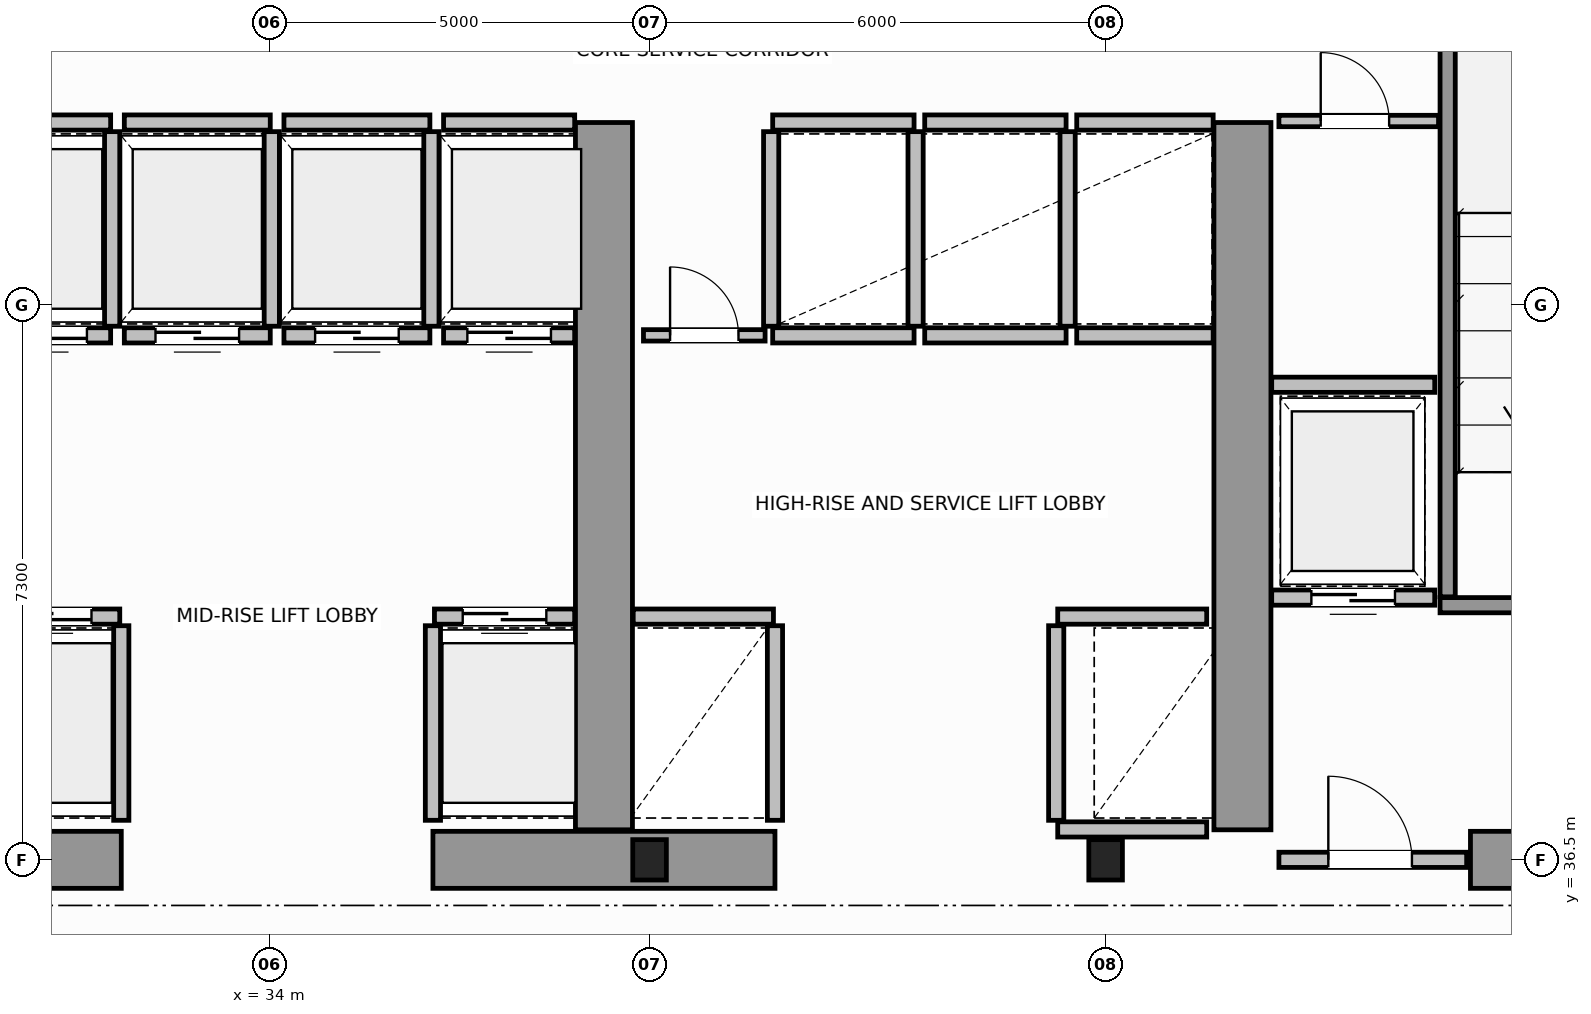
"""IFC4 building model, lengths in metres.
Left out: names, types, materials, properties, quantities, classifications, styles, units other than length and angle.
Written with IfcOpenShell. Run it as: python <this file> out.ifc"""

import sys

from ifc_helpers import new_model, si_unit, direction, frame, frame_2d, origin, origin_2d, place, context, subcontext, project, spatial, rectangle, i_section, extrude, source, transform, mapped, element, fill, save


model = new_model("IFC4")
c1 = context("Model", 3, precision=1e-05, world=origin(), true_north=direction((0.0, 1.0)))
c2 = subcontext(c1, "Body", "Model", "MODEL_VIEW")
j1 = project(units=[si_unit("LENGTHUNIT", "METRE"), si_unit("PLANEANGLEUNIT", "RADIAN")], contexts=[c1])
p1 = place(None, origin())
s1 = spatial("IfcSite", under=j1, at=p1, CompositionType="ELEMENT")
p2 = place(p1, origin())
s2 = spatial("IfcBuilding", under=s1, at=p2, CompositionType="ELEMENT")
p3 = place(p2, frame((0.0, 0.0, 133.8)))
s3 = spatial("IfcBuildingStorey", under=s2, at=p3, CompositionType="ELEMENT", Elevation=133.8)
m1 = source(origin(), c2, "Body", "SweptSolid", [
    extrude(i_section(OverallWidth=0.442, OverallDepth=0.531, WebThickness=0.065, FlangeThickness=0.076, FilletRadius=0.015, at=origin_2d()), origin(), (0.0, 0.0, 1.0), 3.8),
])
for number, where, z_axis, x_axis in (
    (1, (39.0, 36.5, 0.0), (0.0, 0.0, 1.0), (1.0, 0.0, 0.0)),
    (2, (45.0, 36.5, 0.0), (0.0, 0.0, 1.0), (1.0, 0.0, 0.0)),
):
    element("IfcColumn", number, at=place(p3, frame(where, z_axis=z_axis, x_axis=x_axis)), inside=s3, PredefinedType="COLUMN", context=c2, shape_type="MappedRepresentation", body=[
        mapped(m1, transform((0.0, 0.0, 0.0), scale=1.0)),
    ])
for number, where, z_axis, x_axis in (
    (3, (27.55, 36.5, 0.0), (0.0, 0.0, 1.0), (1.0, 0.0, 0.0)),
    (4, (36.15, 36.5, 0.0), (0.0, 0.0, 1.0), (1.0, 0.0, 0.0)),
):
    element("IfcWall", number, at=place(p3, frame(where, z_axis=z_axis, x_axis=x_axis)), inside=s3, PredefinedType="SHEAR", context=c2, shape_type="SweptSolid", body=[
        extrude(rectangle(XDim=4.5, YDim=0.75, at=frame_2d((2.25, 0.0))), origin(), (0.0, 0.0, 1.0), 3.8),
    ])
p4 = place(p3, frame((49.8, 36.5, 0.0), z_axis=(0.0, 0.0, 1.0), x_axis=(1.0, 0.0, 0.0)))
e5 = element("IfcWall", 5, at=p4, inside=s3, PredefinedType="SHEAR", context=c2, shape_type="SweptSolid", body=[
    extrude(rectangle(XDim=3.805, YDim=0.75, at=frame_2d((1.902, 0.0))), origin(), (0.0, 0.0, 1.0), 2.38),
])
for number, where, z_axis, x_axis in (
    (6, (38.4, 36.895, 0.0), (0.0, 0.0, 1.0), (0.0, 1.0, 0.0)),
    (7, (46.8, 36.895, 0.0), (0.0, 0.0, 1.0), (0.0, 1.0, 0.0)),
):
    element("IfcWall", number, at=place(p3, frame(where, z_axis=z_axis, x_axis=x_axis)), inside=s3, PredefinedType="SHEAR", context=c2, shape_type="SweptSolid", body=[
        extrude(rectangle(XDim=9.305, YDim=0.75, at=frame_2d((4.652, 0.0))), origin(), (0.0, 0.0, 1.0), 3.8),
    ])
p5 = place(p3, frame((49.4, 39.85, 0.0), z_axis=(0.0, 0.0, 1.0), x_axis=(1.0, 0.0, 0.0)))
e8 = element("IfcWall", 8, at=p5, inside=s3, PredefinedType="SOLIDWALL", context=c2, shape_type="SweptSolid", body=[
    extrude(rectangle(XDim=4.225, YDim=0.2, at=frame_2d((2.113, 0.0))), origin(), (0.0, 0.0, 1.0), 3.8),
])
p6 = place(p5, frame((1.325, 0.0, 0.0)))
e9 = element("IfcOpeningElement", 9, at=p6, cuts=e8, PredefinedType="OPENING", context=c2, shape_type="SweptSolid", body=[
    extrude(rectangle(XDim=1.1, YDim=2.15, at=frame_2d((0.55, 1.075))), frame((0.0, 0.11, 0.0), z_axis=(0.0, -1.0, 0.0), x_axis=(1.0, 0.0, 0.0)), (0.0, 0.0, 1.0), 0.22),
])
p7 = place(p3, frame((49.5, 39.96, 0.0), z_axis=(0.0, 0.0, 1.0), x_axis=(0.0, 1.0, 0.0)))
e10 = element("IfcWall", 10, at=p7, inside=s3, PredefinedType="SOLIDWALL", context=c2, shape_type="SweptSolid", body=[
    extrude(rectangle(XDim=9.93, YDim=0.2, at=frame_2d((4.965, 0.0))), origin(), (0.0, 0.0, 1.0), 3.8),
])
p8 = place(p3, frame((47.28, 36.5, 0.0), z_axis=(0.0, 0.0, 1.0), x_axis=(1.0, 0.0, 0.0)))
e11 = element("IfcWall", 11, at=p8, inside=s3, PredefinedType="SOLIDWALL", context=c2, shape_type="SweptSolid", body=[
    extrude(rectangle(XDim=2.47, YDim=0.2, at=frame_2d((1.235, 0.0))), origin(), (0.0, 0.0, 1.0), 2.37),
])
p9 = place(p8, frame((0.65, 0.0, 0.0)))
e12 = element("IfcOpeningElement", 12, at=p9, cuts=e11, PredefinedType="OPENING", context=c2, shape_type="SweptSolid", body=[
    extrude(rectangle(XDim=1.1, YDim=2.15, at=frame_2d((0.55, 1.075))), frame((0.0, 0.11, 0.0), z_axis=(0.0, -1.0, 0.0), x_axis=(1.0, 0.0, 0.0)), (0.0, 0.0, 1.0), 0.22),
])
p10 = place(p3, frame((30.185, 39.7, 0.0), z_axis=(0.0, 0.0, 1.0), x_axis=(1.0, 0.0, 0.0)))
e13 = element("IfcWall", 13, at=p10, inside=s3, PredefinedType="SOLIDWALL", context=c2, shape_type="SweptSolid", body=[
    extrude(rectangle(XDim=1.845, YDim=0.2, at=frame_2d((0.922, 0.0))), origin(), (0.0, 0.0, 1.0), 3.58),
])
p11 = place(p10, frame((0.373, 0.0, 0.0)))
e14 = element("IfcOpeningElement", 14, at=p11, cuts=e13, PredefinedType="OPENING", context=c2, shape_type="SweptSolid", body=[
    extrude(rectangle(XDim=1.1, YDim=2.15, at=frame_2d((0.55, 1.075))), frame((0.0, 0.11, 0.0), z_axis=(0.0, -1.0, 0.0), x_axis=(1.0, 0.0, 0.0)), (0.0, 0.0, 1.0), 0.22),
])
p12 = place(p3, frame((32.05, 37.02, 0.0), z_axis=(0.0, 0.0, 1.0), x_axis=(0.0, 1.0, 0.0)))
e15 = element("IfcWall", 15, at=p12, inside=s3, PredefinedType="SOLIDWALL", context=c2, shape_type="SweptSolid", body=[
    extrude(rectangle(XDim=2.56, YDim=0.2, at=frame_2d((1.28, 0.0))), origin(), (0.0, 0.0, 1.0), 3.58),
])
p13 = place(p3, frame((36.17, 39.7, 0.0), z_axis=(0.0, 0.0, 1.0), x_axis=(1.0, 0.0, 0.0)))
e16 = element("IfcWall", 16, at=p13, inside=s3, PredefinedType="SOLIDWALL", context=c2, shape_type="SweptSolid", body=[
    extrude(rectangle(XDim=1.845, YDim=0.2, at=frame_2d((0.922, 0.0))), origin(), (0.0, 0.0, 1.0), 3.58),
])
p14 = place(p13, frame((0.372, 0.0, 0.0)))
e17 = element("IfcOpeningElement", 17, at=p14, cuts=e16, PredefinedType="OPENING", context=c2, shape_type="SweptSolid", body=[
    extrude(rectangle(XDim=1.1, YDim=2.15, at=frame_2d((0.55, 1.075))), frame((0.0, 0.11, 0.0), z_axis=(0.0, -1.0, 0.0), x_axis=(1.0, 0.0, 0.0)), (0.0, 0.0, 1.0), 0.22),
])
p15 = place(p3, frame((36.15, 37.02, 0.0), z_axis=(0.0, 0.0, 1.0), x_axis=(0.0, 1.0, 0.0)))
e18 = element("IfcWall", 18, at=p15, inside=s3, PredefinedType="SOLIDWALL", context=c2, shape_type="SweptSolid", body=[
    extrude(rectangle(XDim=2.56, YDim=0.2, at=frame_2d((1.28, 0.0))), origin(), (0.0, 0.0, 1.0), 3.58),
])
p16 = place(p3, frame((30.185, 43.4, 0.0), z_axis=(0.0, 0.0, 1.0), x_axis=(1.0, 0.0, 0.0)))
e19 = element("IfcWall", 19, at=p16, inside=s3, PredefinedType="SOLIDWALL", context=c2, shape_type="SweptSolid", body=[
    extrude(rectangle(XDim=1.725, YDim=0.2, at=frame_2d((0.862, 0.0))), origin(), (0.0, 0.0, 1.0), 3.58),
])
p17 = place(p16, frame((0.313, 0.0, 0.0)))
e20 = element("IfcOpeningElement", 20, at=p17, cuts=e19, PredefinedType="OPENING", context=c2, shape_type="SweptSolid", body=[
    extrude(rectangle(XDim=1.1, YDim=2.15, at=frame_2d((0.55, 1.075))), frame((0.0, 0.11, 0.0), z_axis=(0.0, -1.0, 0.0), x_axis=(1.0, 0.0, 0.0)), (0.0, 0.0, 1.0), 0.22),
])
p18 = place(p3, frame((30.185, 46.2, 0.0), z_axis=(0.0, 0.0, 1.0), x_axis=(1.0, 0.0, 0.0)))
e21 = element("IfcWall", 21, at=p18, inside=s3, PredefinedType="SOLIDWALL", context=c2, shape_type="SweptSolid", body=[
    extrude(rectangle(XDim=1.725, YDim=0.2, at=frame_2d((0.862, 0.0))), origin(), (0.0, 0.0, 1.0), 3.58),
])
p19 = place(p3, frame((31.93, 43.52, 0.0), z_axis=(0.0, 0.0, 1.0), x_axis=(0.0, 1.0, 0.0)))
e22 = element("IfcWall", 22, at=p19, inside=s3, PredefinedType="SOLIDWALL", context=c2, shape_type="SweptSolid", body=[
    extrude(rectangle(XDim=2.56, YDim=0.2, at=frame_2d((1.28, 0.0))), origin(), (0.0, 0.0, 1.0), 3.58),
])
p20 = place(p3, frame((32.09, 43.4, 0.0), z_axis=(0.0, 0.0, 1.0), x_axis=(1.0, 0.0, 0.0)))
e23 = element("IfcWall", 23, at=p20, inside=s3, PredefinedType="SOLIDWALL", context=c2, shape_type="SweptSolid", body=[
    extrude(rectangle(XDim=1.92, YDim=0.2, at=frame_2d((0.96, 0.0))), origin(), (0.0, 0.0, 1.0), 3.58),
])
p21 = place(p20, frame((0.41, 0.0, 0.0)))
e24 = element("IfcOpeningElement", 24, at=p21, cuts=e23, PredefinedType="OPENING", context=c2, shape_type="SweptSolid", body=[
    extrude(rectangle(XDim=1.1, YDim=2.15, at=frame_2d((0.55, 1.075))), frame((0.0, 0.11, 0.0), z_axis=(0.0, -1.0, 0.0), x_axis=(1.0, 0.0, 0.0)), (0.0, 0.0, 1.0), 0.22),
])
p22 = place(p3, frame((32.09, 46.2, 0.0), z_axis=(0.0, 0.0, 1.0), x_axis=(1.0, 0.0, 0.0)))
e25 = element("IfcWall", 25, at=p22, inside=s3, PredefinedType="SOLIDWALL", context=c2, shape_type="SweptSolid", body=[
    extrude(rectangle(XDim=1.92, YDim=0.2, at=frame_2d((0.96, 0.0))), origin(), (0.0, 0.0, 1.0), 3.58),
])
p23 = place(p3, frame((34.03, 43.52, 0.0), z_axis=(0.0, 0.0, 1.0), x_axis=(0.0, 1.0, 0.0)))
e26 = element("IfcWall", 26, at=p23, inside=s3, PredefinedType="SOLIDWALL", context=c2, shape_type="SweptSolid", body=[
    extrude(rectangle(XDim=2.56, YDim=0.2, at=frame_2d((1.28, 0.0))), origin(), (0.0, 0.0, 1.0), 3.58),
])
p24 = place(p3, frame((34.19, 43.4, 0.0), z_axis=(0.0, 0.0, 1.0), x_axis=(1.0, 0.0, 0.0)))
e27 = element("IfcWall", 27, at=p24, inside=s3, PredefinedType="SOLIDWALL", context=c2, shape_type="SweptSolid", body=[
    extrude(rectangle(XDim=1.92, YDim=0.2, at=frame_2d((0.96, 0.0))), origin(), (0.0, 0.0, 1.0), 3.58),
])
p25 = place(p24, frame((0.41, 0.0, 0.0)))
e28 = element("IfcOpeningElement", 28, at=p25, cuts=e27, PredefinedType="OPENING", context=c2, shape_type="SweptSolid", body=[
    extrude(rectangle(XDim=1.1, YDim=2.15, at=frame_2d((0.55, 1.075))), frame((0.0, 0.11, 0.0), z_axis=(0.0, -1.0, 0.0), x_axis=(1.0, 0.0, 0.0)), (0.0, 0.0, 1.0), 0.22),
])
p26 = place(p3, frame((34.19, 46.2, 0.0), z_axis=(0.0, 0.0, 1.0), x_axis=(1.0, 0.0, 0.0)))
e29 = element("IfcWall", 29, at=p26, inside=s3, PredefinedType="SOLIDWALL", context=c2, shape_type="SweptSolid", body=[
    extrude(rectangle(XDim=1.92, YDim=0.2, at=frame_2d((0.96, 0.0))), origin(), (0.0, 0.0, 1.0), 3.58),
])
p27 = place(p3, frame((36.13, 43.52, 0.0), z_axis=(0.0, 0.0, 1.0), x_axis=(0.0, 1.0, 0.0)))
e30 = element("IfcWall", 30, at=p27, inside=s3, PredefinedType="SOLIDWALL", context=c2, shape_type="SweptSolid", body=[
    extrude(rectangle(XDim=2.56, YDim=0.2, at=frame_2d((1.28, 0.0))), origin(), (0.0, 0.0, 1.0), 3.58),
])
p28 = place(p3, frame((36.29, 43.4, 0.0), z_axis=(0.0, 0.0, 1.0), x_axis=(1.0, 0.0, 0.0)))
e31 = element("IfcWall", 31, at=p28, inside=s3, PredefinedType="SOLIDWALL", context=c2, shape_type="SweptSolid", body=[
    extrude(rectangle(XDim=1.725, YDim=0.2, at=frame_2d((0.862, 0.0))), origin(), (0.0, 0.0, 1.0), 3.58),
])
p29 = place(p28, frame((0.313, 0.0, 0.0)))
e32 = element("IfcOpeningElement", 32, at=p29, cuts=e31, PredefinedType="OPENING", context=c2, shape_type="SweptSolid", body=[
    extrude(rectangle(XDim=1.1, YDim=2.15, at=frame_2d((0.55, 1.075))), frame((0.0, 0.11, 0.0), z_axis=(0.0, -1.0, 0.0), x_axis=(1.0, 0.0, 0.0)), (0.0, 0.0, 1.0), 0.22),
])
p30 = place(p3, frame((36.29, 46.2, 0.0), z_axis=(0.0, 0.0, 1.0), x_axis=(1.0, 0.0, 0.0)))
e33 = element("IfcWall", 33, at=p30, inside=s3, PredefinedType="SOLIDWALL", context=c2, shape_type="SweptSolid", body=[
    extrude(rectangle(XDim=1.725, YDim=0.2, at=frame_2d((0.862, 0.0))), origin(), (0.0, 0.0, 1.0), 3.58),
])
p31 = place(p3, frame((38.785, 39.7, 0.0), z_axis=(0.0, 0.0, 1.0), x_axis=(1.0, 0.0, 0.0)))
e34 = element("IfcWall", 34, at=p31, inside=s3, PredefinedType="SOLIDWALL", context=c2, shape_type="SweptSolid", body=[
    extrude(rectangle(XDim=1.845, YDim=0.2, at=frame_2d((0.922, 0.0))), origin(), (0.0, 0.0, 1.0), 3.58),
])
p32 = place(p3, frame((40.65, 37.02, 0.0), z_axis=(0.0, 0.0, 1.0), x_axis=(0.0, 1.0, 0.0)))
e35 = element("IfcWall", 35, at=p32, inside=s3, PredefinedType="SOLIDWALL", context=c2, shape_type="SweptSolid", body=[
    extrude(rectangle(XDim=2.56, YDim=0.2, at=frame_2d((1.28, 0.0))), origin(), (0.0, 0.0, 1.0), 3.58),
])
p33 = place(p3, frame((44.37, 39.7, 0.0), z_axis=(0.0, 0.0, 1.0), x_axis=(1.0, 0.0, 0.0)))
e36 = element("IfcWall", 36, at=p33, inside=s3, PredefinedType="SOLIDWALL", context=c2, shape_type="SweptSolid", body=[
    extrude(rectangle(XDim=1.96, YDim=0.2, at=frame_2d((0.98, 0.0))), origin(), (0.0, 0.0, 1.0), 3.58),
])
p34 = place(p3, frame((44.37, 36.9, 0.0), z_axis=(0.0, 0.0, 1.0), x_axis=(1.0, 0.0, 0.0)))
e37 = element("IfcWall", 37, at=p34, inside=s3, PredefinedType="SOLIDWALL", context=c2, shape_type="SweptSolid", body=[
    extrude(rectangle(XDim=1.96, YDim=0.2, at=frame_2d((0.98, 0.0))), origin(), (0.0, 0.0, 1.0), 2.37),
])
p35 = place(p3, frame((44.35, 37.02, 0.0), z_axis=(0.0, 0.0, 1.0), x_axis=(0.0, 1.0, 0.0)))
e38 = element("IfcWall", 38, at=p35, inside=s3, PredefinedType="SOLIDWALL", context=c2, shape_type="SweptSolid", body=[
    extrude(rectangle(XDim=2.56, YDim=0.2, at=frame_2d((1.28, 0.0))), origin(), (0.0, 0.0, 1.0), 3.58),
])
for number, where, z_axis, x_axis in (
    (39, (40.62, 43.4, 0.0), (0.0, 0.0, 1.0), (1.0, 0.0, 0.0)),
    (40, (40.62, 46.2, 0.0), (0.0, 0.0, 1.0), (1.0, 0.0, 0.0)),
):
    element("IfcWall", number, at=place(p3, frame(where, z_axis=z_axis, x_axis=x_axis)), inside=s3, PredefinedType="SOLIDWALL", context=c2, shape_type="SweptSolid", body=[
        extrude(rectangle(XDim=1.86, YDim=0.2, at=frame_2d((0.93, 0.0))), origin(), (0.0, 0.0, 1.0), 3.58),
    ])
for number, where, z_axis, x_axis in (
    (41, (40.6, 43.52, 0.0), (0.0, 0.0, 1.0), (0.0, 1.0, 0.0)),
    (42, (42.5, 43.52, 0.0), (0.0, 0.0, 1.0), (0.0, 1.0, 0.0)),
):
    element("IfcWall", number, at=place(p3, frame(where, z_axis=z_axis, x_axis=x_axis)), inside=s3, PredefinedType="SOLIDWALL", context=c2, shape_type="SweptSolid", body=[
        extrude(rectangle(XDim=2.56, YDim=0.2, at=frame_2d((1.28, 0.0))), origin(), (0.0, 0.0, 1.0), 3.58),
    ])
for number, where, z_axis, x_axis in (
    (43, (42.62, 43.4, 0.0), (0.0, 0.0, 1.0), (1.0, 0.0, 0.0)),
    (44, (42.62, 46.2, 0.0), (0.0, 0.0, 1.0), (1.0, 0.0, 0.0)),
):
    element("IfcWall", number, at=place(p3, frame(where, z_axis=z_axis, x_axis=x_axis)), inside=s3, PredefinedType="SOLIDWALL", context=c2, shape_type="SweptSolid", body=[
        extrude(rectangle(XDim=1.86, YDim=0.2, at=frame_2d((0.93, 0.0))), origin(), (0.0, 0.0, 1.0), 3.58),
    ])
p36 = place(p3, frame((44.5, 43.52, 0.0), z_axis=(0.0, 0.0, 1.0), x_axis=(0.0, 1.0, 0.0)))
e45 = element("IfcWall", 45, at=p36, inside=s3, PredefinedType="SOLIDWALL", context=c2, shape_type="SweptSolid", body=[
    extrude(rectangle(XDim=2.56, YDim=0.2, at=frame_2d((1.28, 0.0))), origin(), (0.0, 0.0, 1.0), 3.58),
])
for number, where, z_axis, x_axis in (
    (46, (44.62, 43.4, 0.0), (0.0, 0.0, 1.0), (1.0, 0.0, 0.0)),
    (47, (44.62, 46.2, 0.0), (0.0, 0.0, 1.0), (1.0, 0.0, 0.0)),
):
    element("IfcWall", number, at=place(p3, frame(where, z_axis=z_axis, x_axis=x_axis)), inside=s3, PredefinedType="SOLIDWALL", context=c2, shape_type="SweptSolid", body=[
        extrude(rectangle(XDim=1.795, YDim=0.2, at=frame_2d((0.897, 0.0))), origin(), (0.0, 0.0, 1.0), 3.58),
    ])
p37 = place(p3, frame((47.185, 39.95, 0.0), z_axis=(0.0, 0.0, 1.0), x_axis=(1.0, 0.0, 0.0)))
e48 = element("IfcWall", 48, at=p37, inside=s3, PredefinedType="SOLIDWALL", context=c2, shape_type="SweptSolid", body=[
    extrude(rectangle(XDim=2.145, YDim=0.2, at=frame_2d((1.073, 0.0))), origin(), (0.0, 0.0, 1.0), 3.58),
])
p38 = place(p37, frame((0.522, 0.0, 0.0)))
e49 = element("IfcOpeningElement", 49, at=p38, cuts=e48, PredefinedType="OPENING", context=c2, shape_type="SweptSolid", body=[
    extrude(rectangle(XDim=1.1, YDim=2.15, at=frame_2d((0.55, 1.075))), frame((0.0, 0.11, 0.0), z_axis=(0.0, -1.0, 0.0), x_axis=(1.0, 0.0, 0.0)), (0.0, 0.0, 1.0), 0.22),
])
p39 = place(p3, frame((47.185, 42.75, 0.0), z_axis=(0.0, 0.0, 1.0), x_axis=(1.0, 0.0, 0.0)))
e50 = element("IfcWall", 50, at=p39, inside=s3, PredefinedType="SOLIDWALL", context=c2, shape_type="SweptSolid", body=[
    extrude(rectangle(XDim=2.145, YDim=0.2, at=frame_2d((1.073, 0.0))), origin(), (0.0, 0.0, 1.0), 3.58),
])
p40 = place(p3, frame((47.28, 46.22, 0.0), z_axis=(0.0, 0.0, 1.0), x_axis=(1.0, 0.0, 0.0)))
e51 = element("IfcWall", 51, at=p40, inside=s3, PredefinedType="PARTITIONING", context=c2, shape_type="SweptSolid", body=[
    extrude(rectangle(XDim=2.1, YDim=0.15, at=frame_2d((1.05, 0.0))), origin(), (0.0, 0.0, 1.0), 3.58),
])
p41 = place(p40, frame((0.55, 0.0, 0.0)))
e52 = element("IfcOpeningElement", 52, at=p41, cuts=e51, PredefinedType="OPENING", context=c2, shape_type="SweptSolid", body=[
    extrude(rectangle(XDim=0.9, YDim=2.1, at=frame_2d((0.45, 1.05))), frame((0.0, 0.085, 0.0), z_axis=(0.0, -1.0, 0.0), x_axis=(1.0, 0.0, 0.0)), (0.0, 0.0, 1.0), 0.17),
])
p42 = place(p3, frame((38.92, 43.4, 0.0), z_axis=(0.0, 0.0, 1.0), x_axis=(1.0, 0.0, 0.0)))
e53 = element("IfcWall", 53, at=p42, inside=s3, PredefinedType="PARTITIONING", context=c2, shape_type="SweptSolid", body=[
    extrude(rectangle(XDim=1.6, YDim=0.15, at=frame_2d((0.8, 0.0))), origin(), (0.0, 0.0, 1.0), 3.58),
])
p43 = place(p42, frame((0.35, 0.0, 0.0)))
e54 = element("IfcOpeningElement", 54, at=p43, cuts=e53, PredefinedType="OPENING", context=c2, shape_type="SweptSolid", body=[
    extrude(rectangle(XDim=0.9, YDim=2.1, at=frame_2d((0.45, 1.05))), frame((0.0, 0.085, 0.0), z_axis=(0.0, -1.0, 0.0), x_axis=(1.0, 0.0, 0.0)), (0.0, 0.0, 1.0), 0.17),
])
m2 = source(origin(), c2, "Body", "SweptSolid", [
    extrude(rectangle(XDim=1.1, YDim=2.15, at=frame_2d((0.55, 1.075))), frame((0.0, 0.025, 0.0), z_axis=(0.0, -1.0, 0.0), x_axis=(1.0, 0.0, 0.0)), (0.0, 0.0, 1.0), 0.05),
])
p44 = place(p9, origin())
e55 = element("IfcDoor", 55, at=p44, inside=s3, OperationType="SINGLE_SWING_LEFT", PredefinedType="DOOR", context=c2, shape_type="MappedRepresentation", body=[
    mapped(m2, transform((0.0, 0.0, 0.0), scale=1.0)),
])
fill(e12, e55)
p45 = place(p11, origin())
e56 = element("IfcDoor", 56, at=p45, inside=s3, OperationType="DOUBLE_DOOR_SLIDING", PredefinedType="DOOR", context=c2, shape_type="MappedRepresentation", body=[
    mapped(m2, transform((0.0, 0.0, 0.0), scale=1.0)),
])
fill(e14, e56)
p46 = place(p14, origin())
e57 = element("IfcDoor", 57, at=p46, inside=s3, OperationType="DOUBLE_DOOR_SLIDING", PredefinedType="DOOR", context=c2, shape_type="MappedRepresentation", body=[
    mapped(m2, transform((0.0, 0.0, 0.0), scale=1.0)),
])
fill(e17, e57)
p47 = place(p17, origin())
e58 = element("IfcDoor", 58, at=p47, inside=s3, OperationType="DOUBLE_DOOR_SLIDING", PredefinedType="DOOR", context=c2, shape_type="MappedRepresentation", body=[
    mapped(m2, transform((0.0, 0.0, 0.0), scale=1.0)),
])
fill(e20, e58)
p48 = place(p21, origin())
e59 = element("IfcDoor", 59, at=p48, inside=s3, OperationType="DOUBLE_DOOR_SLIDING", PredefinedType="DOOR", context=c2, shape_type="MappedRepresentation", body=[
    mapped(m2, transform((0.0, 0.0, 0.0), scale=1.0)),
])
fill(e24, e59)
p49 = place(p25, origin())
e60 = element("IfcDoor", 60, at=p49, inside=s3, OperationType="DOUBLE_DOOR_SLIDING", PredefinedType="DOOR", context=c2, shape_type="MappedRepresentation", body=[
    mapped(m2, transform((0.0, 0.0, 0.0), scale=1.0)),
])
fill(e28, e60)
p50 = place(p29, origin())
e61 = element("IfcDoor", 61, at=p50, inside=s3, OperationType="DOUBLE_DOOR_SLIDING", PredefinedType="DOOR", context=c2, shape_type="MappedRepresentation", body=[
    mapped(m2, transform((0.0, 0.0, 0.0), scale=1.0)),
])
fill(e32, e61)
p51 = place(p38, origin())
e62 = element("IfcDoor", 62, at=p51, inside=s3, OperationType="DOUBLE_DOOR_SLIDING", PredefinedType="DOOR", context=c2, shape_type="MappedRepresentation", body=[
    mapped(m2, transform((0.0, 0.0, 0.0), scale=1.0)),
])
fill(e49, e62)
m3 = source(origin(), c2, "Body", "SweptSolid", [
    extrude(rectangle(XDim=0.9, YDim=2.1, at=frame_2d((0.45, 1.05))), frame((0.0, 0.025, 0.0), z_axis=(0.0, -1.0, 0.0), x_axis=(1.0, 0.0, 0.0)), (0.0, 0.0, 1.0), 0.05),
])
p52 = place(p41, origin())
e63 = element("IfcDoor", 63, at=p52, inside=s3, OperationType="SINGLE_SWING_RIGHT", PredefinedType="DOOR", context=c2, shape_type="MappedRepresentation", body=[
    mapped(m3, transform((0.0, 0.0, 0.0), scale=1.0)),
])
fill(e52, e63)
p53 = place(p43, origin())
e64 = element("IfcDoor", 64, at=p53, inside=s3, OperationType="SINGLE_SWING_LEFT", PredefinedType="DOOR", context=c2, shape_type="MappedRepresentation", body=[
    mapped(m3, transform((0.0, 0.0, 0.0), scale=1.0)),
])
fill(e54, e64)
save(model, sys.argv[1])
